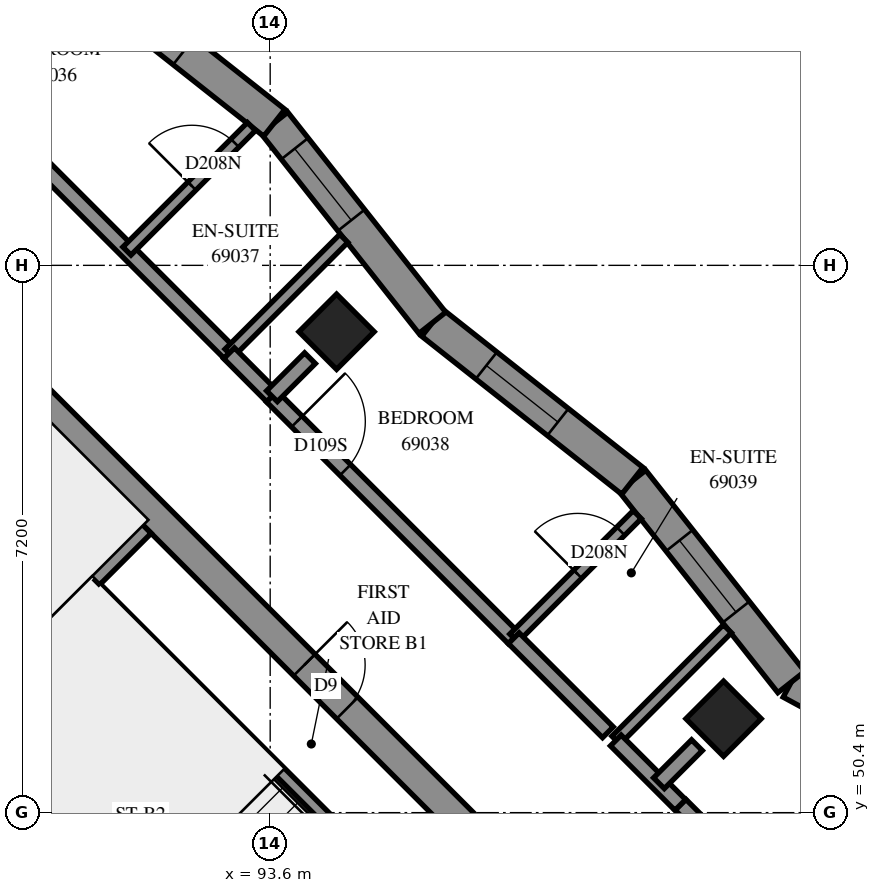
"""IFC4 building model, lengths in metres.
Left out: names, types, materials, properties, quantities, classifications, styles, units other than length and angle.
Written with IfcOpenShell. Run it as: python <this file> out.ifc"""

import sys

from ifc_helpers import new_model, si_unit, direction, frame, frame_2d, origin, origin_2d, place, context, subcontext, project, spatial, polyline, rectangle, outline, extrude, element, fill, save


model = new_model("IFC4")
c1 = context("Model", 3, precision=1e-05, world=origin(), true_north=direction((0.0, 1.0)))
c2 = subcontext(c1, "Body", "Model", "MODEL_VIEW")
j1 = project(units=[si_unit("LENGTHUNIT", "METRE"), si_unit("PLANEANGLEUNIT", "RADIAN")], contexts=[c1])
p1 = place(None, origin())
s1 = spatial("IfcSite", under=j1, at=p1, CompositionType="ELEMENT")
p2 = place(p1, origin())
s2 = spatial("IfcBuilding", under=s1, at=p2, CompositionType="ELEMENT")
p3 = place(p2, frame((0.0, 0.0, 254.0)))
s3 = spatial("IfcBuildingStorey", under=s2, at=p3, CompositionType="ELEMENT", Elevation=254.0)
for number, where, z_axis, x_axis in (
    (1, (94.474, 56.727, 0.0), (0.0, 0.0, 1.0), (0.707, -0.707, 0.0)),
    (2, (99.565, 51.635, 0.0), (0.0, 0.0, 1.0), (0.707, -0.707, 0.0)),
):
    element("IfcColumn", number, at=place(p3, frame(where, z_axis=z_axis, x_axis=x_axis)), inside=s3, PredefinedType="COLUMN", context=c2, shape_type="SweptSolid", body=[
        extrude(rectangle(XDim=0.7, YDim=0.7, at=origin_2d()), origin(), (0.0, 0.0, 1.0), 3.1),
    ])
p4 = place(p3, frame((86.695, 59.696, -0.3), z_axis=(0.0, 0.0, 1.0), x_axis=(0.7071100706, -0.7071034917, 0.0)))
e3 = element("IfcWall", 3, at=p4, inside=s3, PredefinedType="SHEAR", context=c2, shape_type="SweptSolid", body=[
    extrude(rectangle(XDim=15.2, YDim=0.4, at=frame_2d((7.6, 0.0))), origin(), (0.0, 0.0, 1.0), 2.7),
])
p5 = place(p4, frame((10.4, 0.0, 0.3)))
e4 = element("IfcOpeningElement", 4, at=p5, cuts=e3, PredefinedType="OPENING", context=c2, shape_type="SweptSolid", body=[
    extrude(rectangle(XDim=0.8, YDim=2.1, at=frame_2d((0.4, 1.05))), frame((0.0, 0.21, 0.0), z_axis=(0.0, -1.0, 0.0), x_axis=(1.0, 0.0, 0.0)), (0.0, 0.0, 1.0), 0.42),
])
p6 = place(p3, frame((81.534, 53.969, 0.0), z_axis=(0.0, 0.0, 1.0), x_axis=(0.707103309, -0.7071102534, 0.0)))
e5 = element("IfcWall", 5, at=p6, inside=s3, PredefinedType="SOLIDWALL", context=c2, shape_type="SweptSolid", body=[
    extrude(rectangle(XDim=14.4, YDim=0.3, at=frame_2d((7.2, 0.0))), origin(), (0.0, 0.0, 1.0), 3.1),
])
p7 = place(p6, frame((8.55, 0.0, 0.0)))
e6 = element("IfcOpeningElement", 6, at=p7, cuts=e5, PredefinedType="OPENING", context=c2, shape_type="SweptSolid", body=[
    extrude(rectangle(XDim=0.9, YDim=2.1, at=frame_2d((0.45, 1.05))), frame((0.0, 0.16, 0.0), z_axis=(0.0, -1.0, 0.0), x_axis=(1.0, 0.0, 0.0)), (0.0, 0.0, 1.0), 0.32),
])
p8 = place(p6, frame((1.25, 0.0, 0.0)))
e7 = element("IfcOpeningElement", 7, at=p8, cuts=e5, PredefinedType="OPENING", context=c2, shape_type="SweptSolid", body=[
    extrude(rectangle(XDim=1.1, YDim=2.1, at=frame_2d((0.55, 1.05))), frame((0.0, 0.16, 0.0), z_axis=(0.0, -1.0, 0.0), x_axis=(1.0, 0.0, 0.0)), (0.0, 0.0, 1.0), 0.32),
])
p9 = place(p6, frame((4.85, 0.0, 0.0)))
e8 = element("IfcOpeningElement", 8, at=p9, cuts=e5, PredefinedType="OPENING", context=c2, shape_type="SweptSolid", body=[
    extrude(rectangle(XDim=1.1, YDim=2.1, at=frame_2d((0.55, 1.05))), frame((0.0, 0.16, 0.0), z_axis=(0.0, -1.0, 0.0), x_axis=(1.0, 0.0, 0.0)), (0.0, 0.0, 1.0), 0.32),
])
p10 = place(p6, frame((12.05, 0.0, 0.0)))
e9 = element("IfcOpeningElement", 9, at=p10, cuts=e5, PredefinedType="OPENING", context=c2, shape_type="SweptSolid", body=[
    extrude(rectangle(XDim=1.1, YDim=2.1, at=frame_2d((0.55, 1.05))), frame((0.0, 0.16, 0.0), z_axis=(0.0, -1.0, 0.0), x_axis=(1.0, 0.0, 0.0)), (0.0, 0.0, 1.0), 0.32),
])
p11 = place(p3, frame((88.958, 51.211, 0.0), z_axis=(0.0, 0.0, 1.0), x_axis=(0.7070998367, -0.7071137256, 0.0)))
e10 = element("IfcWall", 10, at=p11, inside=s3, PredefinedType="SOLIDWALL", context=c2, shape_type="SweptSolid", body=[
    extrude(rectangle(XDim=7.2, YDim=0.3, at=frame_2d((3.6, 0.0))), origin(), (0.0, 0.0, 1.0), 3.1),
])
p12 = place(p3, frame((88.958, 51.211, 0.0), z_axis=(0.0, 0.0, 1.0), x_axis=(0.7071067812, 0.7071067812, 0.0)))
e11 = element("IfcWall", 11, at=p12, inside=s3, PredefinedType="SOLIDWALL", context=c2, shape_type="SweptSolid", body=[
    extrude(rectangle(XDim=4.2, YDim=0.3, at=frame_2d((2.1, 0.0))), origin(), (0.0, 0.0, 1.0), 3.1),
])
p13 = place(p3, frame((99.246, 46.544, 0.0), z_axis=(0.0, 0.0, 1.0), x_axis=(0.7071067812, 0.7071067812, 0.0)))
e12 = element("IfcWall", 12, at=p13, inside=s3, PredefinedType="SOLIDWALL", context=c2, shape_type="SweptSolid", body=[
    extrude(outline(polyline([(0.225, -0.225), (6.016, -0.225), (5.413, 0.225), (-0.225, 0.225), (0.225, -0.225)])), origin(), (0.0, 0.0, 1.0), 3.1),
])
p14 = place(p13, frame((0.713, 0.0, 0.6)))
e13 = element("IfcOpeningElement", 13, at=p14, cuts=e12, PredefinedType="OPENING", context=c2, shape_type="SweptSolid", body=[
    extrude(rectangle(XDim=1.8, YDim=1.9, at=frame_2d((0.9, 0.95))), frame((0.0, 0.235, 0.0), z_axis=(0.0, -1.0, 0.0), x_axis=(1.0, 0.0, 0.0)), (0.0, 0.0, 1.0), 0.47),
])
p15 = place(p3, frame((103.287, 50.585, 0.0), z_axis=(0.0, 0.0, 1.0), x_axis=(-0.8793857115, 0.4761100403, 0.0)))
e14 = element("IfcWall", 14, at=p15, inside=s3, PredefinedType="SOLIDWALL", context=c2, shape_type="SweptSolid", body=[
    extrude(outline(polyline([(-0.302, -0.225), (3.173, -0.225), (3.266, 0.225), (0.302, 0.225), (-0.302, -0.225)])), origin(), (0.0, 0.0, 1.0), 3.1),
])
p16 = place(p15, frame((1.161, 0.0, 0.45)))
e15 = element("IfcOpeningElement", 15, at=p16, cuts=e14, PredefinedType="OPENING", context=c2, shape_type="SweptSolid", body=[
    extrude(rectangle(XDim=1.2, YDim=2.55, at=frame_2d((0.6, 1.275))), frame((0.0, 0.235, 0.0), z_axis=(0.0, -1.0, 0.0), x_axis=(1.0, 0.0, 0.0)), (0.0, 0.0, 1.0), 0.47),
])
p17 = place(p3, frame((100.456, 52.118, 0.0), z_axis=(0.0, 0.0, 1.0), x_axis=(-0.6198499423, 0.7847203636, 0.0)))
e16 = element("IfcWall", 16, at=p17, inside=s3, PredefinedType="SOLIDWALL", context=c2, shape_type="SweptSolid", body=[
    extrude(outline(polyline([(0.046, -0.225), (3.4, -0.225), (3.347, 0.225), (-0.046, 0.225), (0.046, -0.225)])), origin(), (0.0, 0.0, 1.0), 3.1),
])
p18 = place(p17, frame((1.174, 0.0, 0.45)))
e17 = element("IfcOpeningElement", 17, at=p18, cuts=e16, PredefinedType="OPENING", context=c2, shape_type="SweptSolid", body=[
    extrude(rectangle(XDim=1.2, YDim=2.55, at=frame_2d((0.6, 1.275))), frame((0.0, 0.235, 0.0), z_axis=(0.0, -1.0, 0.0), x_axis=(1.0, 0.0, 0.0)), (0.0, 0.0, 1.0), 0.47),
])
p19 = place(p3, frame((98.365, 54.765, 0.0), z_axis=(0.0, 0.0, 1.0), x_axis=(-0.7847316147, 0.6198356984, 0.0)))
e18 = element("IfcWall", 18, at=p19, inside=s3, PredefinedType="SOLIDWALL", context=c2, shape_type="SweptSolid", body=[
    extrude(outline(polyline([(-0.026, -0.225), (3.327, -0.225), (3.38, 0.225), (0.026, 0.225), (-0.026, -0.225)])), origin(), (0.0, 0.0, 1.0), 3.1),
])
p20 = place(p19, frame((1.248, 0.0, 0.45)))
e19 = element("IfcOpeningElement", 19, at=p20, cuts=e18, PredefinedType="OPENING", context=c2, shape_type="SweptSolid", body=[
    extrude(rectangle(XDim=1.2, YDim=2.55, at=frame_2d((0.6, 1.275))), frame((0.0, 0.235, 0.0), z_axis=(0.0, -1.0, 0.0), x_axis=(1.0, 0.0, 0.0)), (0.0, 0.0, 1.0), 0.47),
])
p21 = place(p3, frame((95.733, 56.844, 0.0), z_axis=(0.0, 0.0, 1.0), x_axis=(-0.6198356984, 0.7847316147, 0.0)))
e20 = element("IfcWall", 20, at=p21, inside=s3, PredefinedType="SOLIDWALL", context=c2, shape_type="SweptSolid", body=[
    extrude(outline(polyline([(0.026, -0.225), (3.38, -0.225), (3.327, 0.225), (-0.026, 0.225), (0.026, -0.225)])), origin(), (0.0, 0.0, 1.0), 3.1),
])
p22 = place(p21, frame((1.72, 0.0, 0.45)))
e21 = element("IfcOpeningElement", 21, at=p22, cuts=e20, PredefinedType="OPENING", context=c2, shape_type="SweptSolid", body=[
    extrude(rectangle(XDim=1.2, YDim=2.55, at=frame_2d((0.6, 1.275))), frame((0.0, 0.235, 0.0), z_axis=(0.0, -1.0, 0.0), x_axis=(1.0, 0.0, 0.0)), (0.0, 0.0, 1.0), 0.47),
])
p23 = place(p3, frame((93.654, 59.475, 0.0), z_axis=(0.0, 0.0, 1.0), x_axis=(-0.7847316147, 0.6198356984, 0.0)))
e22 = element("IfcWall", 22, at=p23, inside=s3, PredefinedType="SOLIDWALL", context=c2, shape_type="SweptSolid", body=[
    extrude(outline(polyline([(-0.026, -0.225), (3.327, -0.225), (3.38, 0.225), (0.026, 0.225), (-0.026, -0.225)])), origin(), (0.0, 0.0, 1.0), 3.1),
])
p24 = place(p23, frame((1.519, 0.0, 0.45)))
e23 = element("IfcOpeningElement", 23, at=p24, cuts=e22, PredefinedType="OPENING", context=c2, shape_type="SweptSolid", body=[
    extrude(rectangle(XDim=1.2, YDim=2.55, at=frame_2d((0.6, 1.275))), frame((0.0, 0.235, 0.0), z_axis=(0.0, -1.0, 0.0), x_axis=(1.0, 0.0, 0.0)), (0.0, 0.0, 1.0), 0.47),
])
p25 = place(p3, frame((91.313, 53.354, 0.0), z_axis=(0.0, 0.0, 1.0), x_axis=(0.7071140275, -0.7070995348, 0.0)))
e24 = element("IfcWall", 24, at=p25, inside=s3, PredefinedType="PARTITIONING", context=c2, shape_type="SweptSolid", body=[
    extrude(rectangle(XDim=6.9, YDim=0.15, at=frame_2d((3.45, 0.0))), origin(), (0.0, 0.0, 1.0), 3.1),
])
p26 = place(p3, frame((88.537, 60.973, 0.0), z_axis=(0.0, 0.0, 1.0), x_axis=(0.7071067812, -0.7071067812, 0.0)))
e25 = element("IfcWall", 25, at=p26, inside=s3, PredefinedType="PARTITIONING", context=c2, shape_type="SweptSolid", body=[
    extrude(rectangle(XDim=6.401, YDim=0.2, at=frame_2d((3.2, 0.0))), origin(), (0.0, 0.0, 1.0), 3.1),
])
p27 = place(p26, frame((0.569, 0.0, 0.0)))
e26 = element("IfcOpeningElement", 26, at=p27, cuts=e25, PredefinedType="OPENING", context=c2, shape_type="SweptSolid", body=[
    extrude(rectangle(XDim=0.9, YDim=2.1, at=frame_2d((0.45, 1.05))), frame((0.0, 0.11, 0.0), z_axis=(0.0, -1.0, 0.0), x_axis=(1.0, 0.0, 0.0)), (0.0, 0.0, 1.0), 0.22),
])
p28 = place(p3, frame((93.621, 55.875, 0.0), z_axis=(0.0, 0.0, 1.0), x_axis=(0.7071067812, -0.7071067812, 0.0)))
e27 = element("IfcWall", 27, at=p28, inside=s3, PredefinedType="PARTITIONING", context=c2, shape_type="SweptSolid", body=[
    extrude(rectangle(XDim=4.5, YDim=0.2, at=frame_2d((2.25, 0.0))), origin(), (0.0, 0.0, 1.0), 3.1),
])
p29 = place(p28, frame((0.467, 0.0, 0.0)))
e28 = element("IfcOpeningElement", 28, at=p29, cuts=e27, PredefinedType="OPENING", context=c2, shape_type="SweptSolid", body=[
    extrude(rectangle(XDim=0.9, YDim=2.1, at=frame_2d((0.45, 1.05))), frame((0.0, 0.11, 0.0), z_axis=(0.0, -1.0, 0.0), x_axis=(1.0, 0.0, 0.0)), (0.0, 0.0, 1.0), 0.22),
])
p30 = place(p3, frame((91.716, 57.788, 0.0), z_axis=(0.0, 0.0, 1.0), x_axis=(0.7070851944, 0.7071283673, 0.0)))
e29 = element("IfcWall", 29, at=p30, inside=s3, PredefinedType="PARTITIONING", context=c2, shape_type="SweptSolid", body=[
    extrude(rectangle(XDim=2.316, YDim=0.15, at=frame_2d((1.158, 0.0))), origin(), (0.0, 0.0, 1.0), 3.1),
])
p31 = place(p30, frame((1.209, 0.0, 0.0)))
e30 = element("IfcOpeningElement", 30, at=p31, cuts=e29, PredefinedType="OPENING", context=c2, shape_type="SweptSolid", body=[
    extrude(rectangle(XDim=0.8, YDim=2.1, at=frame_2d((0.4, 1.05))), frame((0.0, 0.085, 0.0), z_axis=(0.0, -1.0, 0.0), x_axis=(1.0, 0.0, 0.0)), (0.0, 0.0, 1.0), 0.17),
])
p32 = place(p3, frame((96.806, 52.696, 0.0), z_axis=(0.0, 0.0, 1.0), x_axis=(0.707085007, 0.7071285547, 0.0)))
e31 = element("IfcWall", 31, at=p32, inside=s3, PredefinedType="PARTITIONING", context=c2, shape_type="SweptSolid", body=[
    extrude(rectangle(XDim=2.296, YDim=0.15, at=frame_2d((1.148, 0.0))), origin(), (0.0, 0.0, 1.0), 3.1),
])
p33 = place(p32, frame((1.189, 0.0, 0.0)))
e32 = element("IfcOpeningElement", 32, at=p33, cuts=e31, PredefinedType="OPENING", context=c2, shape_type="SweptSolid", body=[
    extrude(rectangle(XDim=0.8, YDim=2.1, at=frame_2d((0.4, 1.05))), frame((0.0, 0.085, 0.0), z_axis=(0.0, -1.0, 0.0), x_axis=(1.0, 0.0, 0.0)), (0.0, 0.0, 1.0), 0.17),
])
p34 = place(p3, frame((93.059, 56.445, 0.0), z_axis=(0.0, 0.0, 1.0), x_axis=(0.7071067812, 0.7071067812, 0.0)))
e33 = element("IfcWall", 33, at=p34, inside=s3, PredefinedType="PARTITIONING", context=c2, shape_type="SweptSolid", body=[
    extrude(rectangle(XDim=2.135, YDim=0.15, at=frame_2d((1.067, 0.0))), origin(), (0.0, 0.0, 1.0), 3.1),
])
p35 = place(p3, frame((98.149, 51.353, 0.0), z_axis=(0.0, 0.0, 1.0), x_axis=(0.7070826647, 0.7071308968, 0.0)))
e34 = element("IfcWall", 34, at=p35, inside=s3, PredefinedType="PARTITIONING", context=c2, shape_type="SweptSolid", body=[
    extrude(rectangle(XDim=2.073, YDim=0.15, at=frame_2d((1.037, 0.0))), origin(), (0.0, 0.0, 1.0), 3.1),
])
p36 = place(p3, frame((98.998, 50.504, 0.0), z_axis=(0.0, 0.0, 1.0), x_axis=(0.7076063266, -0.7066068826, 0.0)))
e35 = element("IfcWall", 35, at=p36, inside=s3, PredefinedType="PARTITIONING", context=c2, shape_type="SweptSolid", body=[
    extrude(rectangle(XDim=2.001, YDim=0.2, at=frame_2d((1.001, 0.0))), origin(), (0.0, 0.0, 1.0), 3.1),
])
p37 = place(p3, frame((96.805, 52.695, 0.0), z_axis=(0.0, 0.0, 1.0), x_axis=(0.7073923078, -0.7068211392, 0.0)))
e36 = element("IfcWall", 36, at=p37, inside=s3, PredefinedType="PARTITIONING", context=c2, shape_type="SweptSolid", body=[
    extrude(rectangle(XDim=1.751, YDim=0.2, at=frame_2d((0.875, 0.0))), origin(), (0.0, 0.0, 1.0), 3.1),
])
p38 = place(p3, frame((98.147, 51.349, 0.0), z_axis=(0.0, 0.0, 1.0), x_axis=(0.7071067812, -0.7071067812, 0.0)))
e37 = element("IfcWall", 37, at=p38, inside=s3, PredefinedType="PARTITIONING", context=c2, shape_type="SweptSolid", body=[
    extrude(rectangle(XDim=1.199, YDim=0.2, at=frame_2d((0.6, 0.0))), origin(), (0.0, 0.0, 1.0), 3.1),
])
p39 = place(p3, frame((93.059, 56.443, 0.0), z_axis=(0.0, 0.0, 1.0), x_axis=(0.7058541592, -0.7083571881, 0.0)))
e38 = element("IfcWall", 38, at=p39, inside=s3, PredefinedType="PARTITIONING", context=c2, shape_type="SweptSolid", body=[
    extrude(rectangle(XDim=0.799, YDim=0.2, at=frame_2d((0.4, 0.0))), origin(), (0.0, 0.0, 1.0), 3.1),
])
for number, where, z_axis, x_axis in (
    (39, (93.624, 55.878, 0.0), (0.0, 0.0, 1.0), (0.707, 0.707, 0.0)),
    (40, (98.715, 50.787, 0.0), (0.0, 0.0, 1.0), (0.707, 0.707, 0.0)),
):
    element("IfcWall", number, at=place(p3, frame(where, z_axis=z_axis, x_axis=x_axis)), inside=s3, PredefinedType="PARTITIONING", context=c2, shape_type="SweptSolid", body=[
        extrude(rectangle(XDim=0.707, YDim=0.2, at=frame_2d((0.353, 0.0))), origin(), (0.0, 0.0, 1.0), 3.1),
    ])
p40 = place(p18, origin())
e41 = element("IfcWindow", 41, at=p40, inside=s3, PartitioningType="SINGLE_PANEL", PredefinedType="WINDOW", context=c2, shape_type="SweptSolid", body=[
    extrude(rectangle(XDim=1.2, YDim=2.55, at=frame_2d((0.6, 1.275))), frame((0.0, 0.205, 0.0), z_axis=(0.0, -1.0, 0.0), x_axis=(1.0, 0.0, 0.0)), (0.0, 0.0, 1.0), 0.06),
])
fill(e17, e41)
p41 = place(p20, origin())
e42 = element("IfcWindow", 42, at=p41, inside=s3, PartitioningType="SINGLE_PANEL", PredefinedType="WINDOW", context=c2, shape_type="SweptSolid", body=[
    extrude(rectangle(XDim=1.2, YDim=2.55, at=frame_2d((0.6, 1.275))), frame((0.0, 0.205, 0.0), z_axis=(0.0, -1.0, 0.0), x_axis=(1.0, 0.0, 0.0)), (0.0, 0.0, 1.0), 0.06),
])
fill(e19, e42)
p42 = place(p22, origin())
e43 = element("IfcWindow", 43, at=p42, inside=s3, PartitioningType="SINGLE_PANEL", PredefinedType="WINDOW", context=c2, shape_type="SweptSolid", body=[
    extrude(rectangle(XDim=1.2, YDim=2.55, at=frame_2d((0.6, 1.275))), frame((0.0, 0.205, 0.0), z_axis=(0.0, -1.0, 0.0), x_axis=(1.0, 0.0, 0.0)), (0.0, 0.0, 1.0), 0.06),
])
fill(e21, e43)
p43 = place(p24, origin())
e44 = element("IfcWindow", 44, at=p43, inside=s3, PartitioningType="SINGLE_PANEL", PredefinedType="WINDOW", context=c2, shape_type="SweptSolid", body=[
    extrude(rectangle(XDim=1.2, YDim=2.55, at=frame_2d((0.6, 1.275))), frame((0.0, 0.205, 0.0), z_axis=(0.0, -1.0, 0.0), x_axis=(1.0, 0.0, 0.0)), (0.0, 0.0, 1.0), 0.06),
])
fill(e23, e44)
p44 = place(p5, origin())
e45 = element("IfcDoor", 45, at=p44, inside=s3, OperationType="SINGLE_SWING_RIGHT", PredefinedType="DOOR", context=c2, shape_type="SweptSolid", body=[
    extrude(rectangle(XDim=0.8, YDim=2.1, at=frame_2d((0.4, 1.05))), frame((0.0, 0.025, 0.0), z_axis=(0.0, -1.0, 0.0), x_axis=(1.0, 0.0, 0.0)), (0.0, 0.0, 1.0), 0.05),
])
fill(e4, e45)
p45 = place(p31, origin())
e46 = element("IfcDoor", 46, at=p45, inside=s3, OperationType="SINGLE_SWING_RIGHT", PredefinedType="DOOR", context=c2, shape_type="SweptSolid", body=[
    extrude(rectangle(XDim=0.8, YDim=2.1, at=frame_2d((0.4, 1.05))), frame((0.0, 0.025, 0.0), z_axis=(0.0, -1.0, 0.0), x_axis=(1.0, 0.0, 0.0)), (0.0, 0.0, 1.0), 0.05),
])
fill(e30, e46)
p46 = place(p29, origin())
e47 = element("IfcDoor", 47, at=p46, inside=s3, OperationType="SINGLE_SWING_LEFT", PredefinedType="DOOR", context=c2, shape_type="SweptSolid", body=[
    extrude(rectangle(XDim=0.9, YDim=2.1, at=frame_2d((0.45, 1.05))), frame((0.0, 0.025, 0.0), z_axis=(0.0, -1.0, 0.0), x_axis=(1.0, 0.0, 0.0)), (0.0, 0.0, 1.0), 0.05),
])
fill(e28, e47)
p47 = place(p33, origin())
e48 = element("IfcDoor", 48, at=p47, inside=s3, OperationType="SINGLE_SWING_RIGHT", PredefinedType="DOOR", context=c2, shape_type="SweptSolid", body=[
    extrude(rectangle(XDim=0.8, YDim=2.1, at=frame_2d((0.4, 1.05))), frame((0.0, 0.025, 0.0), z_axis=(0.0, -1.0, 0.0), x_axis=(1.0, 0.0, 0.0)), (0.0, 0.0, 1.0), 0.05),
])
fill(e32, e48)
save(model, sys.argv[1])
